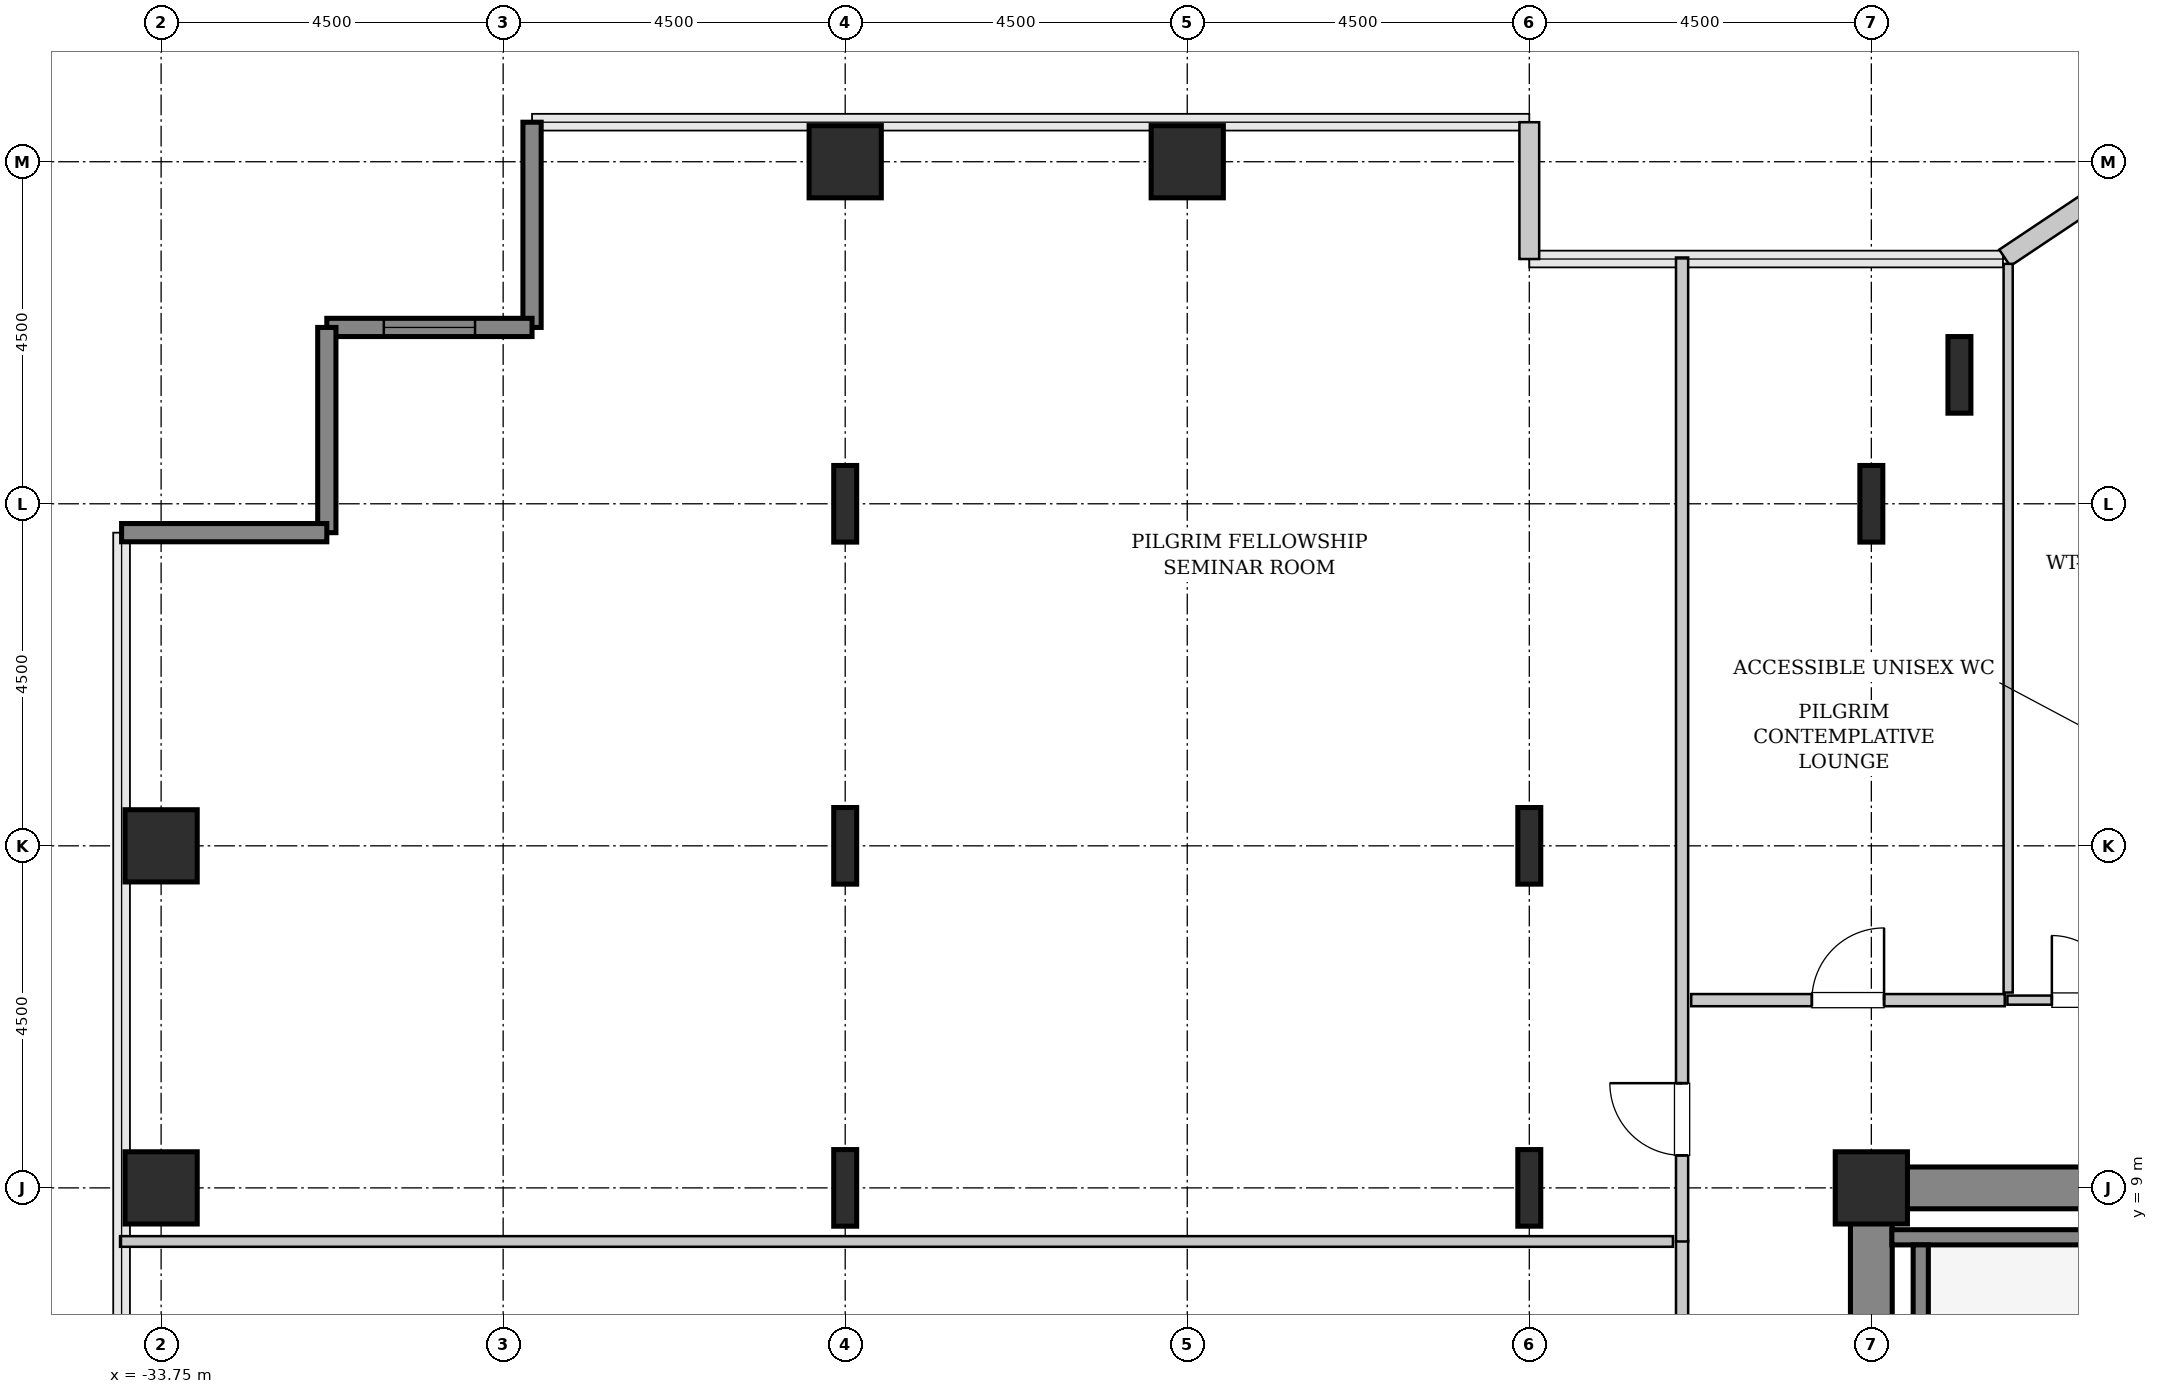
"""IFC4 building model, lengths in metres.
Left out: names, types, materials, properties, quantities, classifications, styles, units other than length and angle.
Written with IfcOpenShell. Run it as: python <this file> out.ifc"""

import sys

from ifc_helpers import new_model, si_unit, direction, frame, frame_2d, origin, origin_2d, place, context, subcontext, project, spatial, rectangle, hollow_rectangle, i_section, extrude, source, transform, mapped, element, fill, save


model = new_model("IFC4")
c1 = context("Model", 3, precision=1e-05, world=origin(), true_north=direction((0.0, 1.0)))
c2 = subcontext(c1, "Body", "Model", "MODEL_VIEW")
j1 = project(units=[si_unit("LENGTHUNIT", "METRE"), si_unit("PLANEANGLEUNIT", "RADIAN")], contexts=[c1])
p1 = place(None, origin())
s1 = spatial("IfcSite", under=j1, at=p1, CompositionType="ELEMENT")
p2 = place(p1, origin())
s2 = spatial("IfcBuilding", under=s1, at=p2, CompositionType="ELEMENT")
p3 = place(p2, frame((0.0, 0.0, 98.4)))
s3 = spatial("IfcBuildingStorey", under=s2, at=p3, CompositionType="ELEMENT", Elevation=98.4)
m1 = source(origin(), c2, "Body", "SweptSolid", [
    extrude(rectangle(XDim=9.975, YDim=0.55, at=frame_2d((4.987, 0.0))), origin(), (0.0, 0.0, 1.0), 3.8),
])
p4 = place(p3, frame((-11.525, 9.0, 0.0), z_axis=(0.0, 0.0, 1.0), x_axis=(1.0, 0.0, 0.0)))
e1 = element("IfcWall", 1, at=p4, inside=s3, PredefinedType="SHEAR", context=c2, shape_type="MappedRepresentation", body=[
    mapped(m1, transform((0.0, 0.0, 0.0), x_axis=(1.0, 0.0, 0.0), y_axis=(0.0, 1.0, 0.0), z_axis=(0.0, 0.0, 1.0), scale=1.0)),
])
m2 = source(origin(), c2, "Body", "SweptSolid", [
    extrude(rectangle(XDim=7.375, YDim=0.55, at=frame_2d((3.688, 0.0))), origin(), (0.0, 0.0, 1.0), 3.8),
])
p5 = place(p3, frame((-11.25, 1.35, 0.0), z_axis=(0.0, 0.0, 1.0), x_axis=(0.0, 1.0, 0.0)))
e2 = element("IfcWall", 2, at=p5, inside=s3, PredefinedType="SHEAR", context=c2, shape_type="MappedRepresentation", body=[
    mapped(m2, transform((0.0, 0.0, 0.0), x_axis=(1.0, 0.0, 0.0), y_axis=(0.0, 1.0, 0.0), z_axis=(0.0, 0.0, 1.0), scale=1.0)),
])
m3 = source(origin(), c2, "Body", "SweptSolid", [
    extrude(hollow_rectangle(XDim=0.95, YDim=0.95, WallThickness=0.045, InnerFilletRadius=0.045, OuterFilletRadius=0.09, at=origin_2d()), origin(), (0.0, 0.0, 1.0), 3.8),
])
for number, where, z_axis, x_axis in (
    (3, (-33.75, 9.0, 0.0), (0.0, 0.0, 1.0), (1.0, 0.0, 0.0)),
    (4, (-33.75, 13.5, 0.0), (0.0, 0.0, 1.0), (1.0, 0.0, 0.0)),
):
    element("IfcColumn", number, at=place(p3, frame(where, z_axis=z_axis, x_axis=x_axis)), inside=s3, PredefinedType="COLUMN", context=c2, shape_type="MappedRepresentation", body=[
        mapped(m3, transform((0.0, 0.0, 0.0), x_axis=(1.0, 0.0, 0.0), y_axis=(0.0, 1.0, 0.0), z_axis=(0.0, 0.0, 1.0), scale=1.0)),
    ])
m4 = source(origin(), c2, "Body", "SweptSolid", [
    extrude(i_section(OverallWidth=0.302, OverallDepth=1.008, WebThickness=0.021, FlangeThickness=0.04, FilletRadius=0.03, at=origin_2d()), origin(), (0.0, 0.0, 1.0), 3.8),
])
for number, where, z_axis, x_axis in (
    (5, (-24.75, 9.0, 0.0), (0.0, 0.0, 1.0), (1.0, 0.0, 0.0)),
    (6, (-24.75, 13.5, 0.0), (0.0, 0.0, 1.0), (1.0, 0.0, 0.0)),
    (7, (-24.75, 18.0, 0.0), (0.0, 0.0, 1.0), (1.0, 0.0, 0.0)),
):
    element("IfcColumn", number, at=place(p3, frame(where, z_axis=z_axis, x_axis=x_axis)), inside=s3, PredefinedType="COLUMN", context=c2, shape_type="MappedRepresentation", body=[
        mapped(m4, transform((0.0, 0.0, 0.0), x_axis=(1.0, 0.0, 0.0), y_axis=(0.0, 1.0, 0.0), z_axis=(0.0, 0.0, 1.0), scale=1.0)),
    ])
for number, where, z_axis, x_axis in (
    (8, (-24.75, 22.5, 0.0), (0.0, 0.0, 1.0), (1.0, 0.0, 0.0)),
    (9, (-20.25, 22.5, 0.0), (0.0, 0.0, 1.0), (1.0, 0.0, 0.0)),
):
    element("IfcColumn", number, at=place(p3, frame(where, z_axis=z_axis, x_axis=x_axis)), inside=s3, PredefinedType="COLUMN", context=c2, shape_type="MappedRepresentation", body=[
        mapped(m3, transform((0.0, 0.0, 0.0), x_axis=(1.0, 0.0, 0.0), y_axis=(0.0, 1.0, 0.0), z_axis=(0.0, 0.0, 1.0), scale=1.0)),
    ])
for number, where, z_axis, x_axis in (
    (10, (-15.75, 9.0, 0.0), (0.0, 0.0, 1.0), (1.0, 0.0, 0.0)),
    (11, (-15.75, 13.5, 0.0), (0.0, 0.0, 1.0), (1.0, 0.0, 0.0)),
):
    element("IfcColumn", number, at=place(p3, frame(where, z_axis=z_axis, x_axis=x_axis)), inside=s3, PredefinedType="COLUMN", context=c2, shape_type="MappedRepresentation", body=[
        mapped(m4, transform((0.0, 0.0, 0.0), x_axis=(1.0, 0.0, 0.0), y_axis=(0.0, 1.0, 0.0), z_axis=(0.0, 0.0, 1.0), scale=1.0)),
    ])
m5 = source(origin(), c2, "Body", "SweptSolid", [
    extrude(hollow_rectangle(XDim=0.95, YDim=0.95, WallThickness=0.045, InnerFilletRadius=0.045, OuterFilletRadius=0.09, at=origin_2d()), origin(), (0.0, 0.0, 1.0), 3.8),
])
p6 = place(p3, frame((-11.25, 9.0, 0.0), z_axis=(0.0, 0.0, 1.0), x_axis=(1.0, 0.0, 0.0)))
e12 = element("IfcColumn", 12, at=p6, inside=s3, PredefinedType="COLUMN", context=c2, shape_type="MappedRepresentation", body=[
    mapped(m5, transform((0.0, 0.0, 0.0), x_axis=(1.0, 0.0, 0.0), y_axis=(0.0, 1.0, 0.0), z_axis=(0.0, 0.0, 1.0), scale=1.0)),
])
for number, where, z_axis, x_axis in (
    (13, (-11.25, 18.0, 0.0), (0.0, 0.0, 1.0), (1.0, 0.0, 0.0)),
    (14, (-10.091, 19.696, 0.0), (0.0, 0.0, 1.0), (1.0, 0.0, 0.0)),
):
    element("IfcColumn", number, at=place(p3, frame(where, z_axis=z_axis, x_axis=x_axis)), inside=s3, PredefinedType="COLUMN", context=c2, shape_type="MappedRepresentation", body=[
        mapped(m4, transform((0.0, 0.0, 0.0), x_axis=(1.0, 0.0, 0.0), y_axis=(0.0, 1.0, 0.0), z_axis=(0.0, 0.0, 1.0), scale=1.0)),
    ])
m6 = source(origin(), c2, "Body", "SweptSolid", [
    extrude(rectangle(XDim=1.469, YDim=0.26, at=frame_2d((0.734, 0.0))), origin(), (0.0, 0.0, 1.0), 3.55),
])
p7 = place(p3, frame((-8.273, 22.052, 0.0), z_axis=(0.0, 0.0, 1.0), x_axis=(-0.831461760506, -0.555581983884, 0.0)))
e15 = element("IfcWall", 15, at=p7, inside=s3, PredefinedType="SOLIDWALL", context=c2, shape_type="MappedRepresentation", body=[
    mapped(m6, transform((0.0, 0.0, 0.0), x_axis=(1.0, 0.0, 0.0), y_axis=(0.0, 1.0, 0.0), z_axis=(0.0, 0.0, 1.0), scale=1.0)),
])
m7 = source(origin(), c2, "Body", "SweptSolid", [
    extrude(rectangle(XDim=1.8, YDim=0.26, at=frame_2d((0.9, 0.0))), origin(), (0.0, 0.0, 1.0), 3.55),
])
p8 = place(p3, frame((-15.75, 21.22, 0.0), z_axis=(0.0, 0.0, 1.0), x_axis=(0.0, 1.0, 0.0)))
e16 = element("IfcWall", 16, at=p8, inside=s3, PredefinedType="SOLIDWALL", context=c2, shape_type="MappedRepresentation", body=[
    mapped(m7, transform((0.0, 0.0, 0.0), x_axis=(1.0, 0.0, 0.0), y_axis=(0.0, 1.0, 0.0), z_axis=(0.0, 0.0, 1.0), scale=1.0)),
])
m8 = source(origin(), c2, "Body", "SweptSolid", [
    extrude(rectangle(XDim=2.7, YDim=0.24, at=frame_2d((1.35, 0.0))), origin(), (0.0, 0.0, 1.0), 3.55),
])
p9 = place(p3, frame((-28.87, 23.02, 0.0), z_axis=(0.0, 0.0, 1.0), x_axis=(0.0, -1.0, 0.0)))
e17 = element("IfcWall", 17, at=p9, inside=s3, PredefinedType="SHEAR", context=c2, shape_type="MappedRepresentation", body=[
    mapped(m8, transform((0.0, 0.0, 0.0), x_axis=(1.0, 0.0, 0.0), y_axis=(0.0, 1.0, 0.0), z_axis=(0.0, 0.0, 1.0), scale=1.0)),
])
p10 = place(p3, frame((-28.87, 20.32, 0.0), z_axis=(0.0, 0.0, 1.0), x_axis=(-1.0, 0.0, 0.0)))
e18 = element("IfcWall", 18, at=p10, inside=s3, PredefinedType="SHEAR", context=c2, shape_type="MappedRepresentation", body=[
    mapped(m8, transform((0.0, 0.0, 0.0), x_axis=(1.0, 0.0, 0.0), y_axis=(0.0, 1.0, 0.0), z_axis=(0.0, 0.0, 1.0), scale=1.0)),
])
p11 = place(p10, frame((0.75, 0.0, 0.85)))
e19 = element("IfcOpeningElement", 19, at=p11, cuts=e18, PredefinedType="OPENING", context=c2, shape_type="SweptSolid", body=[
    extrude(rectangle(XDim=1.2, YDim=1.8, at=frame_2d((0.6, 0.9))), frame((0.0, 0.13, 0.0), z_axis=(0.0, -1.0, 0.0), x_axis=(1.0, 0.0, 0.0)), (0.0, 0.0, 1.0), 0.26),
])
for number, where, z_axis, x_axis in (
    (20, (-31.57, 20.32, 0.0), (0.0, 0.0, 1.0), (0.0, -1.0, 0.0)),
    (21, (-31.57, 17.62, 0.0), (0.0, 0.0, 1.0), (-1.0, 0.0, 0.0)),
):
    element("IfcWall", number, at=place(p3, frame(where, z_axis=z_axis, x_axis=x_axis)), inside=s3, PredefinedType="SHEAR", context=c2, shape_type="MappedRepresentation", body=[
        mapped(m8, transform((0.0, 0.0, 0.0), x_axis=(1.0, 0.0, 0.0), y_axis=(0.0, 1.0, 0.0), z_axis=(0.0, 0.0, 1.0), scale=1.0)),
    ])
m9 = source(origin(), c2, "Body", "SweptSolid", [
    extrude(rectangle(XDim=3.68, YDim=0.2, at=frame_2d((1.84, 0.0))), origin(), (0.0, 0.0, 1.0), 3.8),
])
p12 = place(p3, frame((-7.3, 8.35, 0.0), z_axis=(0.0, 0.0, 1.0), x_axis=(-1.0, 0.0, 0.0)))
e22 = element("IfcWall", 22, at=p12, inside=s3, PredefinedType="SOLIDWALL", context=c2, shape_type="MappedRepresentation", body=[
    mapped(m9, transform((0.0, 0.0, 0.0), x_axis=(1.0, 0.0, 0.0), y_axis=(0.0, 1.0, 0.0), z_axis=(0.0, 0.0, 1.0), scale=1.0)),
])
m10 = source(origin(), c2, "Body", "SweptSolid", [
    extrude(rectangle(XDim=7.1, YDim=0.2, at=frame_2d((3.55, 0.0))), origin(), (0.0, 0.0, 1.0), 3.8),
])
p13 = place(p3, frame((-10.6, 1.15, 0.0), z_axis=(0.0, 0.0, 1.0), x_axis=(0.0, 1.0, 0.0)))
e23 = element("IfcWall", 23, at=p13, inside=s3, PredefinedType="SOLIDWALL", context=c2, shape_type="MappedRepresentation", body=[
    mapped(m10, transform((0.0, 0.0, 0.0), x_axis=(1.0, 0.0, 0.0), y_axis=(0.0, 1.0, 0.0), z_axis=(0.0, 0.0, 1.0), scale=1.0)),
])
m11 = source(origin(), c2, "Body", "SweptSolid", [
    extrude(rectangle(XDim=2.02, YDim=0.12, at=frame_2d((1.01, 0.0))), origin(), (0.0, 0.0, 1.0), 3.535),
])
p14 = place(p3, frame((-9.46, 11.47, 0.0), z_axis=(0.0, 0.0, 1.0), x_axis=(1.0, 0.0, 0.0)))
e24 = element("IfcWall", 24, at=p14, inside=s3, PredefinedType="PLUMBINGWALL", context=c2, shape_type="MappedRepresentation", body=[
    mapped(m11, transform((0.0, 0.0, 0.0), x_axis=(1.0, 0.0, 0.0), y_axis=(0.0, 1.0, 0.0), z_axis=(0.0, 0.0, 1.0), scale=1.0)),
])
p15 = place(p14, frame((0.585, 0.0, 0.0)))
e25 = element("IfcOpeningElement", 25, at=p15, cuts=e24, PredefinedType="OPENING", context=c2, shape_type="SweptSolid", body=[
    extrude(rectangle(XDim=0.85, YDim=2.1, at=frame_2d((0.425, 1.05))), frame((0.0, 0.07, 0.0), z_axis=(0.0, -1.0, 0.0), x_axis=(1.0, 0.0, 0.0)), (0.0, 0.0, 1.0), 0.14),
])
m12 = source(origin(), c2, "Body", "SweptSolid", [
    extrude(rectangle(XDim=9.587, YDim=0.12, at=frame_2d((4.793, 0.0))), origin(), (0.0, 0.0, 1.0), 3.535),
])
p16 = place(p3, frame((-9.45, 11.57, 0.0), z_axis=(0.0, 0.0, 1.0), x_axis=(0.0, 1.0, 0.0)))
e26 = element("IfcWall", 26, at=p16, inside=s3, PredefinedType="PLUMBINGWALL", context=c2, shape_type="MappedRepresentation", body=[
    mapped(m12, transform((0.0, 0.0, 0.0), x_axis=(1.0, 0.0, 0.0), y_axis=(0.0, 1.0, 0.0), z_axis=(0.0, 0.0, 1.0), scale=1.0)),
])
m13 = source(origin(), c2, "Body", "SweptSolid", [
    extrude(rectangle(XDim=3.3, YDim=0.16, at=frame_2d((1.65, 0.0))), origin(), (0.0, 0.0, 1.0), 3.535),
])
p17 = place(p3, frame((-13.74, 5.005, 0.0), z_axis=(0.0, 0.0, 1.0), x_axis=(0.0, 1.0, 0.0)))
e27 = element("IfcWall", 27, at=p17, inside=s3, PredefinedType="PARTITIONING", context=c2, shape_type="MappedRepresentation", body=[
    mapped(m13, transform((0.0, 0.0, 0.0), x_axis=(1.0, 0.0, 0.0), y_axis=(0.0, 1.0, 0.0), z_axis=(0.0, 0.0, 1.0), scale=1.0)),
])
p18 = place(p17, frame((1.175, 0.0, 0.0)))
e28 = element("IfcOpeningElement", 28, at=p18, cuts=e27, PredefinedType="OPENING", context=c2, shape_type="SweptSolid", body=[
    extrude(rectangle(XDim=0.95, YDim=2.1, at=frame_2d((0.475, 1.05))), frame((0.0, 0.09, 0.0), z_axis=(0.0, -1.0, 0.0), x_axis=(1.0, 0.0, 0.0)), (0.0, 0.0, 1.0), 0.18),
])
m14 = source(origin(), c2, "Body", "SweptSolid", [
    extrude(rectangle(XDim=20.43, YDim=0.14, at=frame_2d((10.215, 0.0))), origin(), (0.0, 0.0, 1.0), 3.535),
])
p19 = place(p3, frame((-34.29, 8.295, 0.0), z_axis=(0.0, 0.0, 1.0), x_axis=(1.0, 0.0, 0.0)))
e29 = element("IfcWall", 29, at=p19, inside=s3, PredefinedType="PARTITIONING", context=c2, shape_type="MappedRepresentation", body=[
    mapped(m14, transform((0.0, 0.0, 0.0), x_axis=(1.0, 0.0, 0.0), y_axis=(0.0, 1.0, 0.0), z_axis=(0.0, 0.0, 1.0), scale=1.0)),
])
m15 = source(origin(), c2, "Body", "SweptSolid", [
    extrude(rectangle(XDim=12.945, YDim=0.16, at=frame_2d((6.473, 0.0))), origin(), (0.0, 0.0, 1.0), 3.535),
])
p20 = place(p3, frame((-13.74, 8.295, 0.0), z_axis=(0.0, 0.0, 1.0), x_axis=(0.0, 1.0, 0.0)))
e30 = element("IfcWall", 30, at=p20, inside=s3, PredefinedType="PARTITIONING", context=c2, shape_type="MappedRepresentation", body=[
    mapped(m15, transform((0.0, 0.0, 0.0), x_axis=(1.0, 0.0, 0.0), y_axis=(0.0, 1.0, 0.0), z_axis=(0.0, 0.0, 1.0), scale=1.0)),
])
p21 = place(p20, frame((1.133, 0.0, 0.0)))
e31 = element("IfcOpeningElement", 31, at=p21, cuts=e30, PredefinedType="OPENING", context=c2, shape_type="SweptSolid", body=[
    extrude(rectangle(XDim=0.95, YDim=2.1, at=frame_2d((0.475, 1.05))), frame((0.0, 0.09, 0.0), z_axis=(0.0, -1.0, 0.0), x_axis=(1.0, 0.0, 0.0)), (0.0, 0.0, 1.0), 0.18),
])
m16 = source(origin(), c2, "Body", "SweptSolid", [
    extrude(rectangle(XDim=4.125, YDim=0.16, at=frame_2d((2.062, 0.0))), origin(), (0.0, 0.0, 1.0), 3.535),
])
p22 = place(p3, frame((-13.62, 11.47, 0.0), z_axis=(0.0, 0.0, 1.0), x_axis=(1.0, 0.0, 0.0)))
e32 = element("IfcWall", 32, at=p22, inside=s3, PredefinedType="PARTITIONING", context=c2, shape_type="MappedRepresentation", body=[
    mapped(m16, transform((0.0, 0.0, 0.0), x_axis=(1.0, 0.0, 0.0), y_axis=(0.0, 1.0, 0.0), z_axis=(0.0, 0.0, 1.0), scale=1.0)),
])
p23 = place(p22, frame((1.587, 0.0, 0.0)))
e33 = element("IfcOpeningElement", 33, at=p23, cuts=e32, PredefinedType="OPENING", context=c2, shape_type="SweptSolid", body=[
    extrude(rectangle(XDim=0.95, YDim=2.1, at=frame_2d((0.475, 1.05))), frame((0.0, 0.09, 0.0), z_axis=(0.0, -1.0, 0.0), x_axis=(1.0, 0.0, 0.0)), (0.0, 0.0, 1.0), 0.18),
])
m17 = source(origin(), c2, "Body", "SweptSolid", [
    extrude(rectangle(XDim=1.2, YDim=1.8, at=frame_2d((0.6, 0.9))), frame((0.0, 0.03, 0.0), z_axis=(0.0, -1.0, 0.0), x_axis=(1.0, 0.0, 0.0)), (0.0, 0.0, 1.0), 0.06),
])
p24 = place(p11, origin())
e34 = element("IfcWindow", 34, at=p24, inside=s3, PartitioningType="SINGLE_PANEL", PredefinedType="WINDOW", context=c2, shape_type="MappedRepresentation", body=[
    mapped(m17, transform((0.0, 0.0, 0.0), x_axis=(1.0, 0.0, 0.0), y_axis=(0.0, 1.0, 0.0), z_axis=(0.0, 0.0, 1.0), scale=1.0)),
])
fill(e19, e34)
m18 = source(origin(), c2, "Body", "SweptSolid", [
    extrude(rectangle(XDim=0.85, YDim=2.1, at=frame_2d((0.425, 1.05))), frame((0.0, 0.025, 0.0), z_axis=(0.0, -1.0, 0.0), x_axis=(1.0, 0.0, 0.0)), (0.0, 0.0, 1.0), 0.05),
])
p25 = place(p15, origin())
e35 = element("IfcDoor", 35, at=p25, inside=s3, OperationType="SINGLE_SWING_LEFT", PredefinedType="DOOR", context=c2, shape_type="MappedRepresentation", body=[
    mapped(m18, transform((0.0, 0.0, 0.0), x_axis=(1.0, 0.0, 0.0), y_axis=(0.0, 1.0, 0.0), z_axis=(0.0, 0.0, 1.0), scale=1.0)),
])
fill(e25, e35)
m19 = source(origin(), c2, "Body", "SweptSolid", [
    extrude(rectangle(XDim=0.95, YDim=2.1, at=frame_2d((0.475, 1.05))), frame((0.0, 0.025, 0.0), z_axis=(0.0, -1.0, 0.0), x_axis=(1.0, 0.0, 0.0)), (0.0, 0.0, 1.0), 0.05),
])
p26 = place(p21, origin())
e36 = element("IfcDoor", 36, at=p26, inside=s3, OperationType="SINGLE_SWING_RIGHT", PredefinedType="DOOR", context=c2, shape_type="MappedRepresentation", body=[
    mapped(m19, transform((0.0, 0.0, 0.0), x_axis=(1.0, 0.0, 0.0), y_axis=(0.0, 1.0, 0.0), z_axis=(0.0, 0.0, 1.0), scale=1.0)),
])
fill(e31, e36)
p27 = place(p23, origin())
e37 = element("IfcDoor", 37, at=p27, inside=s3, OperationType="SINGLE_SWING_RIGHT", PredefinedType="DOOR", context=c2, shape_type="MappedRepresentation", body=[
    mapped(m19, transform((0.0, 0.0, 0.0), x_axis=(1.0, 0.0, 0.0), y_axis=(0.0, 1.0, 0.0), z_axis=(0.0, 0.0, 1.0), scale=1.0)),
])
fill(e33, e37)
save(model, sys.argv[1])
